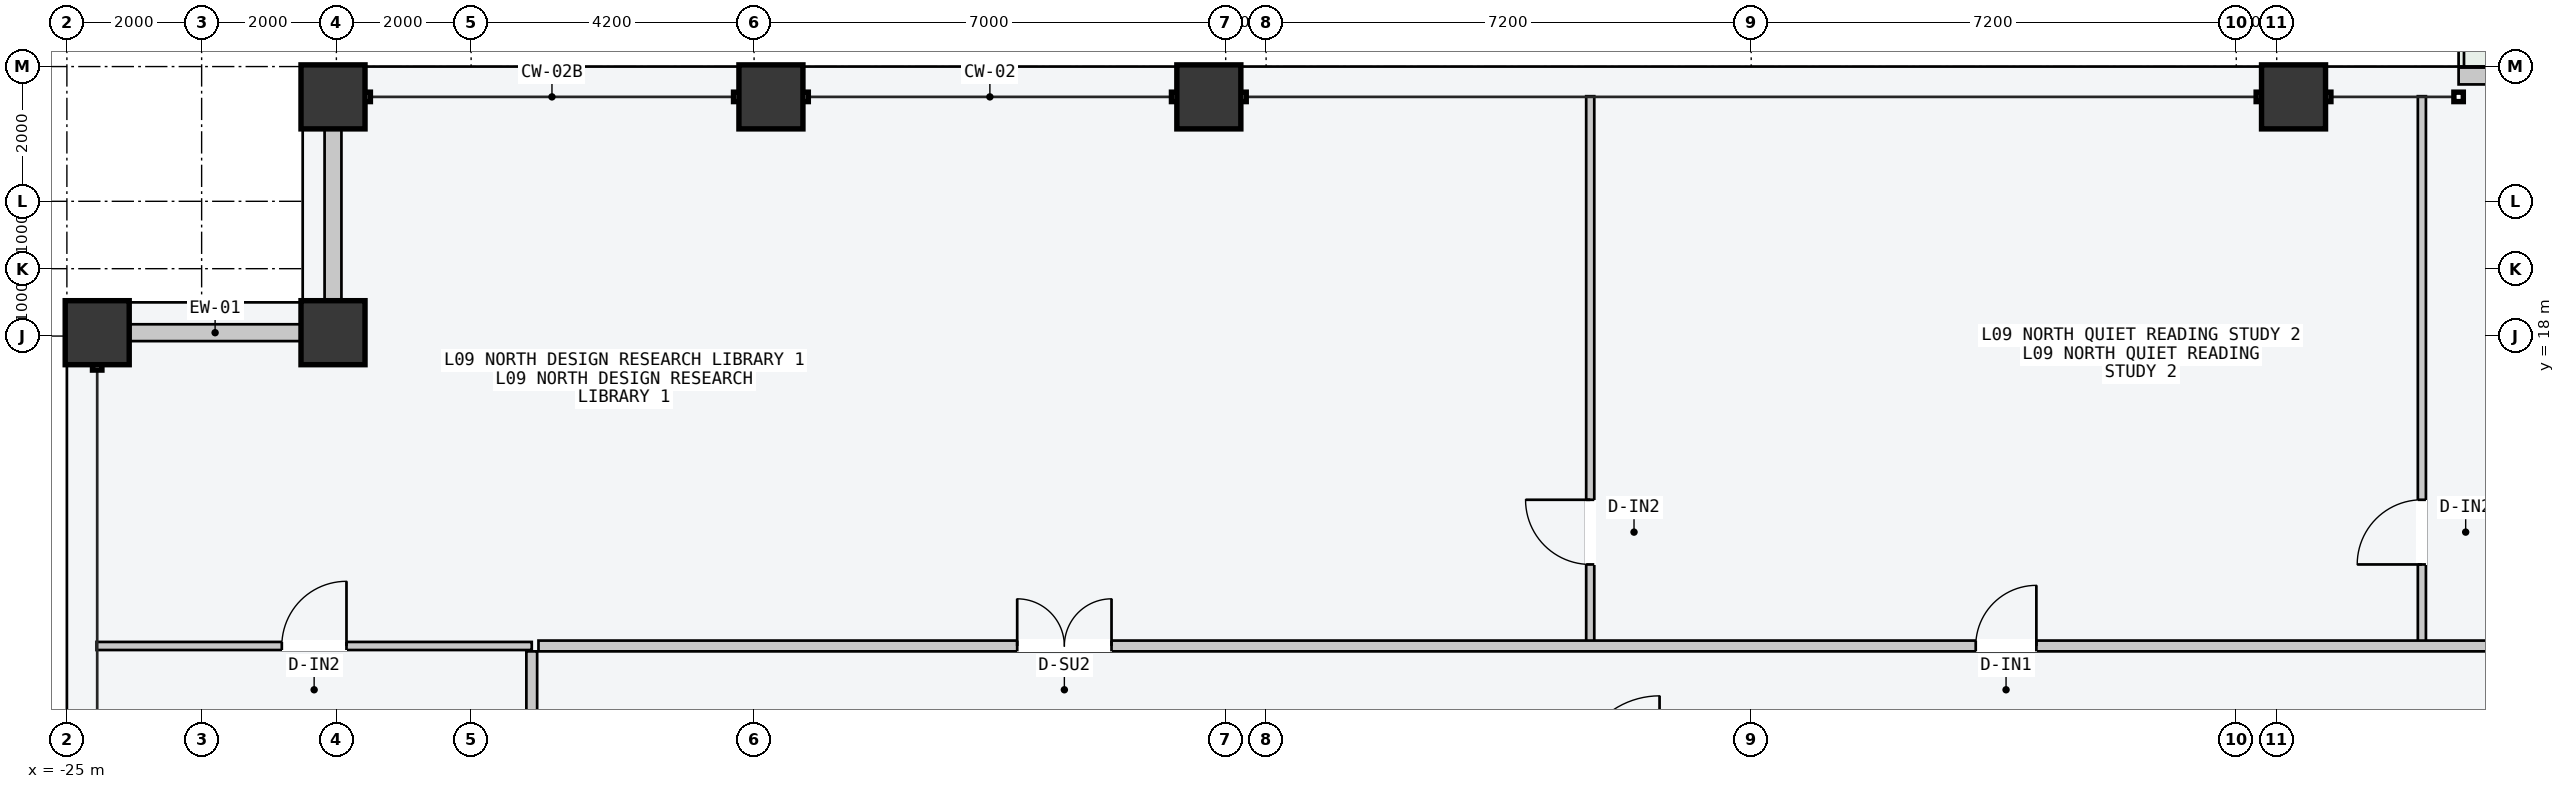
"""IFC4 building model, lengths in metres.
Left out: names, types, materials, properties, quantities, classifications, styles, units other than length and angle.
Written with IfcOpenShell. Run it as: python <this file> out.ifc"""

import sys

from ifc_helpers import new_model, si_unit, direction, frame, frame_2d, origin, origin_2d, place, context, subcontext, project, spatial, rectangle, hollow_rectangle, extrude, element, fill, save


model = new_model("IFC4")
c1 = context("Model", 3, precision=1e-05, world=origin(), true_north=direction((0.0, 1.0)))
c2 = subcontext(c1, "Body", "Model", "MODEL_VIEW")
j1 = project(units=[si_unit("LENGTHUNIT", "METRE"), si_unit("PLANEANGLEUNIT", "RADIAN")], contexts=[c1])
p1 = place(None, origin())
s1 = spatial("IfcSite", under=j1, at=p1, CompositionType="ELEMENT")
p2 = place(p1, origin())
s2 = spatial("IfcBuilding", under=s1, at=p2, CompositionType="ELEMENT")
p3 = place(p2, frame((0.0, 0.0, 38.4)))
s3 = spatial("IfcBuildingStorey", under=s2, at=p3, CompositionType="ELEMENT", Elevation=38.4)
for number, where, z_axis, x_axis in (
    (1, (-21.05, 21.55, 0.0), (0.0, 0.0, 1.0), (1.0, 0.0, 0.0)),
    (2, (-14.55, 21.55, 0.0), (0.0, 0.0, 1.0), (1.0, 0.0, 0.0)),
    (3, (-8.05, 21.55, 0.0), (0.0, 0.0, 1.0), (1.0, 0.0, 0.0)),
    (4, (8.05, 21.55, 0.0), (0.0, 0.0, 1.0), (1.0, 0.0, 0.0)),
    (5, (-24.55, 18.05, 0.0), (0.0, 0.0, 1.0), (0.0, 1.0, 0.0)),
    (6, (-21.05, 18.05, 0.0), (0.0, 0.0, 1.0), (1.0, 0.0, 0.0)),
):
    element("IfcColumn", number, at=place(p3, frame(where, z_axis=z_axis, x_axis=x_axis)), inside=s3, PredefinedType="COLUMN", context=c2, shape_type="SweptSolid", body=[
        extrude(hollow_rectangle(XDim=0.95, YDim=0.95, WallThickness=0.048, at=origin_2d()), origin(), (0.0, 0.0, 1.0), 3.6),
    ])
p4 = place(p3, frame((10.5, 21.86, 0.0), z_axis=(0.0, 0.0, 1.0), x_axis=(1.0, 0.0, 0.0)))
e7 = element("IfcWall", 7, at=p4, inside=s3, PredefinedType="STANDARD", context=c2, shape_type="SweptSolid", body=[
    extrude(rectangle(XDim=3.555, YDim=0.25, at=frame_2d((1.777, 0.0))), origin(), (0.0, 0.0, 1.0), 3.4),
])
p5 = place(p4, frame((0.7, 0.0, 0.85)))
e8 = element("IfcOpeningElement", 8, at=p5, cuts=e7, PredefinedType="OPENING", context=c2, shape_type="SweptSolid", body=[
    extrude(rectangle(XDim=2.2, YDim=2.1, at=frame_2d((1.1, 1.05))), frame((0.0, 0.135, 0.0), z_axis=(0.0, -1.0, 0.0), x_axis=(1.0, 0.0, 0.0)), (0.0, 0.0, 1.0), 0.27),
])
for number, where, z_axis, x_axis in (
    (9, (-24.065, 18.05, 0.0), (0.0, 0.0, 1.0), (1.0, 0.0, 0.0)),
    (10, (-21.05, 18.535, 0.0), (0.0, 0.0, 1.0), (0.0, 1.0, 0.0)),
):
    element("IfcWall", number, at=place(p3, frame(where, z_axis=z_axis, x_axis=x_axis)), inside=s3, PredefinedType="STANDARD", context=c2, shape_type="SweptSolid", body=[
        extrude(rectangle(XDim=2.53, YDim=0.25, at=frame_2d((1.265, 0.0))), origin(), (0.0, 0.0, 1.0), 2.7),
    ])
p6 = place(p3, frame((-2.389, 13.46, 0.0), z_axis=(0.0, 0.0, 1.0), x_axis=(0.0, 1.0, 0.0)))
e11 = element("IfcWall", 11, at=p6, inside=s3, PredefinedType="PARTITIONING", context=c2, shape_type="SweptSolid", body=[
    extrude(rectangle(XDim=8.1, YDim=0.12, at=frame_2d((4.05, 0.0))), origin(), (0.0, 0.0, 1.0), 3.4),
])
p7 = place(p6, frame((1.15, 0.0, 0.0)))
e12 = element("IfcOpeningElement", 12, at=p7, cuts=e11, PredefinedType="OPENING", context=c2, shape_type="SweptSolid", body=[
    extrude(rectangle(XDim=0.96, YDim=2.18, at=frame_2d((0.48, 1.09))), frame((0.0, 0.07, 0.0), z_axis=(0.0, -1.0, 0.0), x_axis=(1.0, 0.0, 0.0)), (0.0, 0.0, 1.0), 0.14),
])
p8 = place(p3, frame((9.955, 13.46, 0.0), z_axis=(0.0, 0.0, 1.0), x_axis=(0.0, 1.0, 0.0)))
e13 = element("IfcWall", 13, at=p8, inside=s3, PredefinedType="PARTITIONING", context=c2, shape_type="SweptSolid", body=[
    extrude(rectangle(XDim=8.1, YDim=0.12, at=frame_2d((4.05, 0.0))), origin(), (0.0, 0.0, 1.0), 3.4),
])
p9 = place(p8, frame((1.15, 0.0, 0.0)))
e14 = element("IfcOpeningElement", 14, at=p9, cuts=e13, PredefinedType="OPENING", context=c2, shape_type="SweptSolid", body=[
    extrude(rectangle(XDim=0.96, YDim=2.18, at=frame_2d((0.48, 1.09))), frame((0.0, 0.07, 0.0), z_axis=(0.0, -1.0, 0.0), x_axis=(1.0, 0.0, 0.0)), (0.0, 0.0, 1.0), 0.14),
])
p10 = place(p3, frame((-18.0, 13.4, 0.0), z_axis=(0.0, 0.0, 1.0), x_axis=(1.0, 0.0, 0.0)))
e15 = element("IfcWall", 15, at=p10, inside=s3, PredefinedType="PARTITIONING", context=c2, shape_type="SweptSolid", body=[
    extrude(rectangle(XDim=36.0, YDim=0.16, at=frame_2d((18.0, 0.0))), origin(), (0.0, 0.0, 1.0), 3.4),
])
p11 = place(p10, frame((7.105, 0.0, 0.0)))
e16 = element("IfcOpeningElement", 16, at=p11, cuts=e15, PredefinedType="OPENING", context=c2, shape_type="SweptSolid", body=[
    extrude(rectangle(XDim=1.4, YDim=2.2, at=frame_2d((0.7, 1.1))), frame((0.0, 0.09, 0.0), z_axis=(0.0, -1.0, 0.0), x_axis=(1.0, 0.0, 0.0)), (0.0, 0.0, 1.0), 0.18),
])
p12 = place(p10, frame((21.333, 0.0, 0.0)))
e17 = element("IfcOpeningElement", 17, at=p12, cuts=e15, PredefinedType="OPENING", context=c2, shape_type="SweptSolid", body=[
    extrude(rectangle(XDim=0.9, YDim=2.15, at=frame_2d((0.45, 1.075))), frame((0.0, 0.09, 0.0), z_axis=(0.0, -1.0, 0.0), x_axis=(1.0, 0.0, 0.0)), (0.0, 0.0, 1.0), 0.18),
])
p13 = place(p10, frame((31.498, 0.0, 0.0)))
e18 = element("IfcOpeningElement", 18, at=p13, cuts=e15, PredefinedType="OPENING", context=c2, shape_type="SweptSolid", body=[
    extrude(rectangle(XDim=0.96, YDim=2.18, at=frame_2d((0.48, 1.09))), frame((0.0, 0.09, 0.0), z_axis=(0.0, -1.0, 0.0), x_axis=(1.0, 0.0, 0.0)), (0.0, 0.0, 1.0), 0.18),
])
p14 = place(p3, frame((-24.56, 13.4, 0.0), z_axis=(0.0, 0.0, 1.0), x_axis=(1.0, 0.0, 0.0)))
e19 = element("IfcWall", 19, at=p14, inside=s3, PredefinedType="PARTITIONING", context=c2, shape_type="SweptSolid", body=[
    extrude(rectangle(XDim=6.46, YDim=0.12, at=frame_2d((3.23, 0.0))), origin(), (0.0, 0.0, 1.0), 3.4),
])
p15 = place(p14, frame((2.75, 0.0, 0.0)))
e20 = element("IfcOpeningElement", 20, at=p15, cuts=e19, PredefinedType="OPENING", context=c2, shape_type="SweptSolid", body=[
    extrude(rectangle(XDim=0.96, YDim=2.18, at=frame_2d((0.48, 1.09))), frame((0.0, 0.07, 0.0), z_axis=(0.0, -1.0, 0.0), x_axis=(1.0, 0.0, 0.0)), (0.0, 0.0, 1.0), 0.14),
])
p16 = place(p3, frame((-18.1, -13.32, 0.0), z_axis=(0.0, 0.0, 1.0), x_axis=(0.0, 1.0, 0.0)))
e21 = element("IfcWall", 21, at=p16, inside=s3, PredefinedType="PARTITIONING", context=c2, shape_type="SweptSolid", body=[
    extrude(rectangle(XDim=26.64, YDim=0.16, at=frame_2d((13.32, 0.0))), origin(), (0.0, 0.0, 1.0), 3.4),
])
p17 = place(p16, frame((4.079, 0.0, 0.0)))
e22 = element("IfcOpeningElement", 22, at=p17, cuts=e21, PredefinedType="OPENING", context=c2, shape_type="SweptSolid", body=[
    extrude(rectangle(XDim=0.9, YDim=2.15, at=frame_2d((0.45, 1.075))), frame((0.0, 0.09, 0.0), z_axis=(0.0, -1.0, 0.0), x_axis=(1.0, 0.0, 0.0)), (0.0, 0.0, 1.0), 0.18),
])
p18 = place(p16, frame((17.369, 0.0, 0.0)))
e23 = element("IfcOpeningElement", 23, at=p18, cuts=e21, PredefinedType="OPENING", context=c2, shape_type="SweptSolid", body=[
    extrude(rectangle(XDim=0.96, YDim=2.18, at=frame_2d((0.48, 1.09))), frame((0.0, 0.09, 0.0), z_axis=(0.0, -1.0, 0.0), x_axis=(1.0, 0.0, 0.0)), (0.0, 0.0, 1.0), 0.18),
])
p19 = place(p7, origin())
e24 = element("IfcDoor", 24, at=p19, inside=s3, OperationType="SINGLE_SWING_RIGHT", PredefinedType="DOOR", context=c2, shape_type="SweptSolid", body=[
    extrude(rectangle(XDim=0.96, YDim=2.18, at=frame_2d((0.48, 1.09))), frame((0.0, 0.025, 0.0), z_axis=(0.0, -1.0, 0.0), x_axis=(1.0, 0.0, 0.0)), (0.0, 0.0, 1.0), 0.05),
])
fill(e12, e24)
p20 = place(p9, origin())
e25 = element("IfcDoor", 25, at=p20, inside=s3, OperationType="SINGLE_SWING_LEFT", PredefinedType="DOOR", context=c2, shape_type="SweptSolid", body=[
    extrude(rectangle(XDim=0.96, YDim=2.18, at=frame_2d((0.48, 1.09))), frame((0.0, 0.025, 0.0), z_axis=(0.0, -1.0, 0.0), x_axis=(1.0, 0.0, 0.0)), (0.0, 0.0, 1.0), 0.05),
])
fill(e14, e25)
p21 = place(p11, origin())
e26 = element("IfcDoor", 26, at=p21, inside=s3, OperationType="DOUBLE_DOOR_SINGLE_SWING", PredefinedType="DOOR", context=c2, shape_type="SweptSolid", body=[
    extrude(rectangle(XDim=1.4, YDim=2.2, at=frame_2d((0.7, 1.1))), frame((0.0, 0.025, 0.0), z_axis=(0.0, -1.0, 0.0), x_axis=(1.0, 0.0, 0.0)), (0.0, 0.0, 1.0), 0.05),
])
fill(e16, e26)
p22 = place(p12, origin())
e27 = element("IfcDoor", 27, at=p22, inside=s3, OperationType="SINGLE_SWING_RIGHT", PredefinedType="DOOR", context=c2, shape_type="SweptSolid", body=[
    extrude(rectangle(XDim=0.9, YDim=2.15, at=frame_2d((0.45, 1.075))), frame((0.0, 0.025, 0.0), z_axis=(0.0, -1.0, 0.0), x_axis=(1.0, 0.0, 0.0)), (0.0, 0.0, 1.0), 0.05),
])
fill(e17, e27)
p23 = place(p15, origin())
e28 = element("IfcDoor", 28, at=p23, inside=s3, OperationType="SINGLE_SWING_RIGHT", PredefinedType="DOOR", context=c2, shape_type="SweptSolid", body=[
    extrude(rectangle(XDim=0.96, YDim=2.18, at=frame_2d((0.48, 1.09))), frame((0.0, 0.025, 0.0), z_axis=(0.0, -1.0, 0.0), x_axis=(1.0, 0.0, 0.0)), (0.0, 0.0, 1.0), 0.05),
])
fill(e20, e28)
save(model, sys.argv[1])
